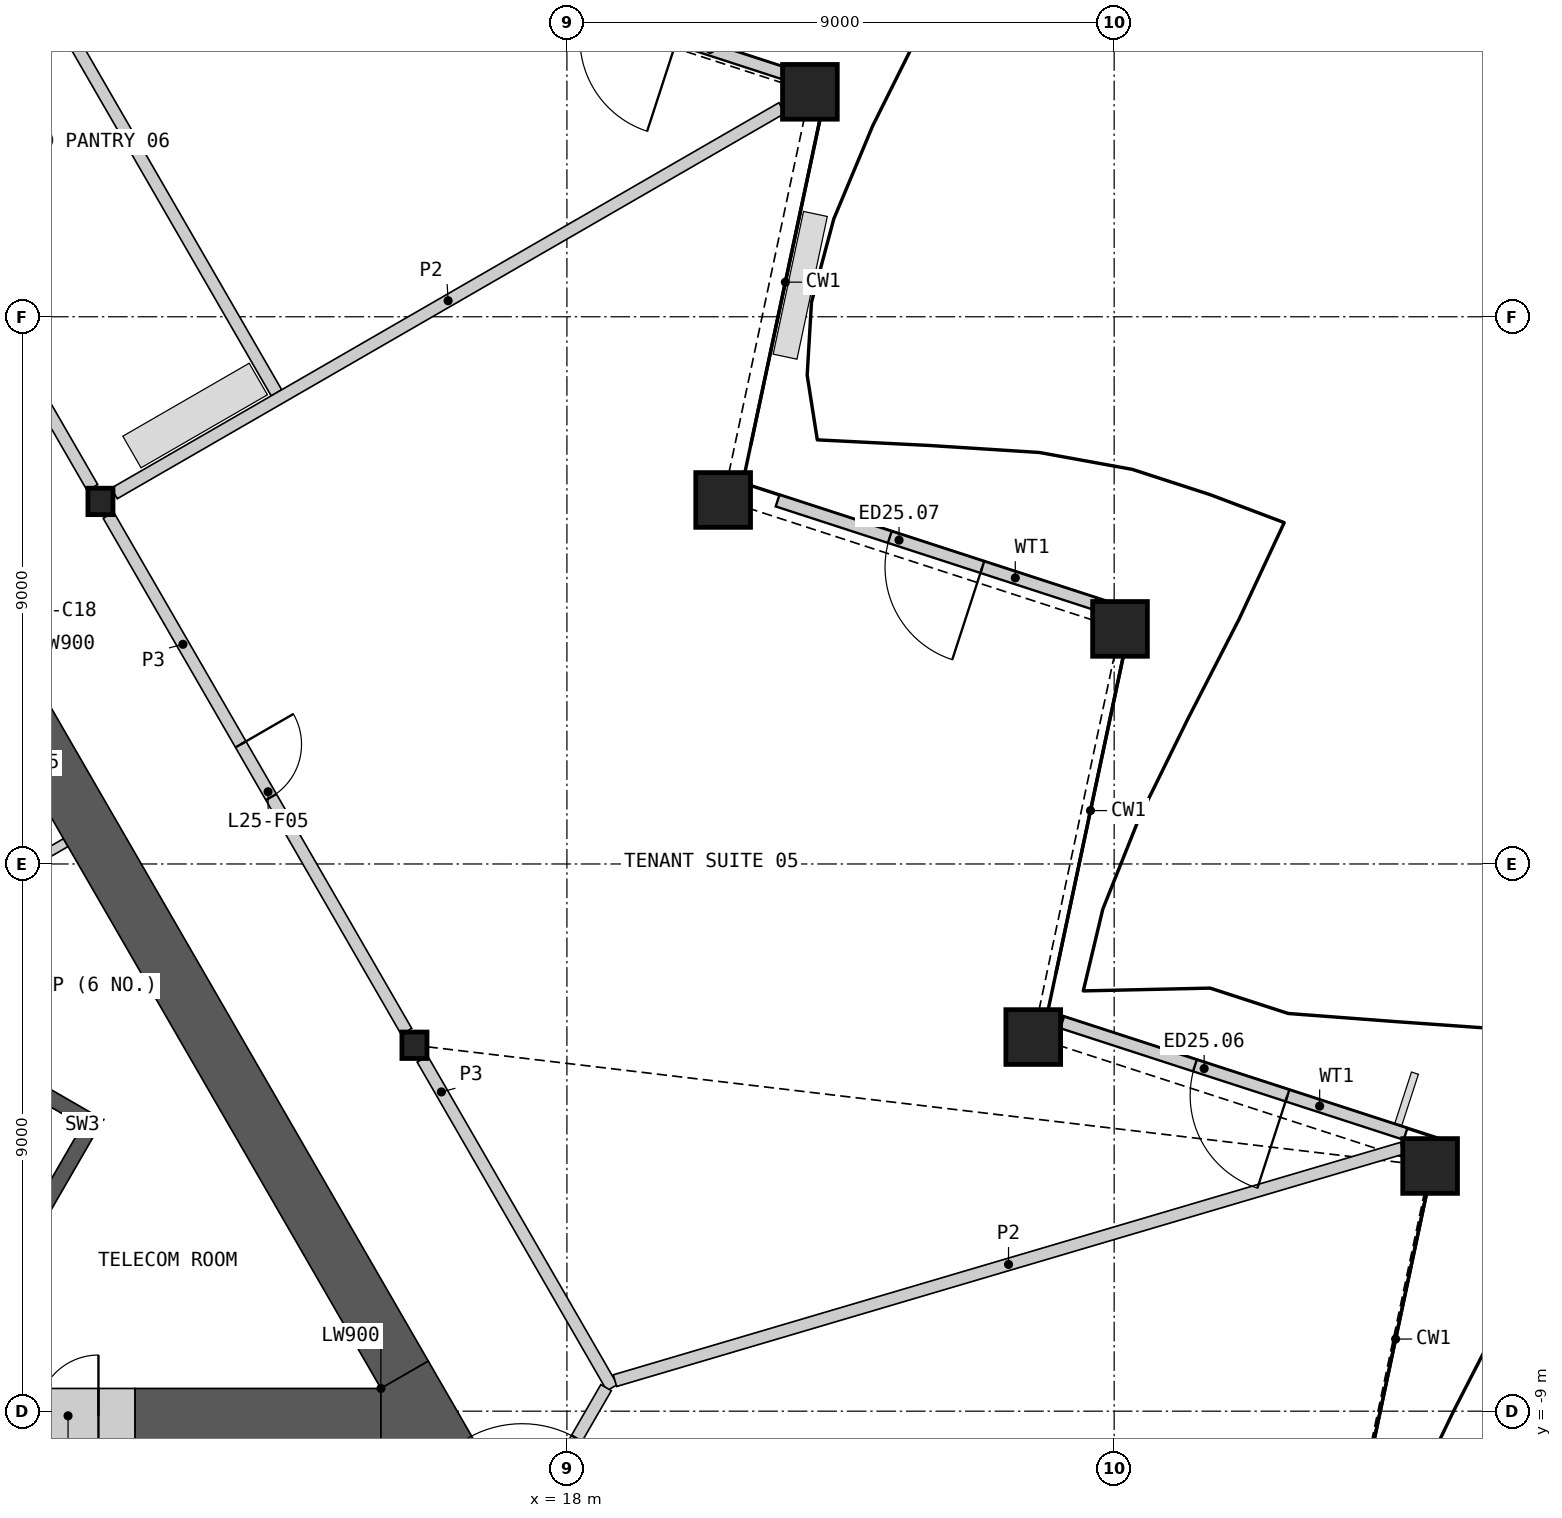
"""IFC4 building model, lengths in metres.
Left out: names, types, materials, properties, quantities, classifications, styles, units other than length and angle.
Written with IfcOpenShell. Run it as: python <this file> out.ifc"""

import sys

from ifc_helpers import new_model, si_unit, direction, frame, frame_2d, origin, origin_2d, place, context, subcontext, project, spatial, polyline, rectangle, hollow_rectangle, i_section, outline, extrude, element, fill, save


model = new_model("IFC4")
c1 = context("Model", 3, precision=1e-05, world=origin(), true_north=direction((0.0, 1.0)))
c2 = subcontext(c1, "Body", "Model", "MODEL_VIEW")
j1 = project(units=[si_unit("LENGTHUNIT", "METRE"), si_unit("PLANEANGLEUNIT", "RADIAN")], contexts=[c1])
p1 = place(None, origin())
s1 = spatial("IfcSite", under=j1, at=p1, CompositionType="ELEMENT")
p2 = place(p1, origin())
s2 = spatial("IfcBuilding", under=s1, at=p2, CompositionType="ELEMENT")
p3 = place(p2, frame((0.0, 0.0, 120.6)))
s3 = spatial("IfcBuildingStorey", under=s2, at=p3, CompositionType="ELEMENT", Elevation=120.6)
for number, where, z_axis, x_axis in (
    (1, (32.196, -4.967, 0.0), (0.0, 0.0, 1.0), (1.0, 0.0, 0.0)),
    (2, (25.669, -2.846, 0.0), (0.0, 0.0, 1.0), (1.0, 0.0, 0.0)),
    (3, (27.096, 3.866, 0.0), (0.0, 0.0, 1.0), (1.0, 0.0, 0.0)),
    (4, (20.57, 5.987, 0.0), (0.0, 0.0, 1.0), (1.0, 0.0, 0.0)),
    (5, (21.996, 12.699, 0.0), (0.0, 0.0, 1.0), (1.0, 0.0, 0.0)),
):
    element("IfcColumn", number, at=place(p3, frame(where, z_axis=z_axis, x_axis=x_axis)), inside=s3, PredefinedType="COLUMN", context=c2, shape_type="SweptSolid", body=[
        extrude(hollow_rectangle(XDim=0.9, YDim=0.9, WallThickness=0.06, at=origin_2d()), origin(), (0.0, 0.0, 1.0), 4.2),
    ])
for number, where, z_axis, x_axis in (
    (6, (15.493, -2.982, 0.0), (0.0, 0.0, 1.0), (1.0, 0.0, 0.0)),
    (7, (10.328, 5.963, 0.0), (0.0, 0.0, 1.0), (1.0, 0.0, 0.0)),
):
    element("IfcColumn", number, at=place(p3, frame(where, z_axis=z_axis, x_axis=x_axis)), inside=s3, PredefinedType="COLUMN", context=c2, shape_type="SweptSolid", body=[
        extrude(i_section(OverallWidth=0.412, OverallDepth=0.435, WebThickness=0.036, FlangeThickness=0.057, at=origin_2d()), origin(), (0.0, 0.0, 1.0), 4.2),
    ])
p4 = place(p3, frame((31.792, -4.441, 0.0), z_axis=(0.0, 0.0, 1.0), x_axis=(-0.951057028782, 0.309015417099, 0.0)))
e8 = element("IfcWall", 8, at=p4, inside=s3, PredefinedType="SOLIDWALL", context=c2, shape_type="SweptSolid", body=[
    extrude(rectangle(XDim=5.938, YDim=0.2, at=frame_2d((2.969, 0.0))), origin(), (0.0, 0.0, 1.0), 3.189),
])
p5 = place(p4, frame((2.042, 0.0, 0.0)))
e9 = element("IfcOpeningElement", 9, at=p5, cuts=e8, PredefinedType="OPENING", context=c2, shape_type="SweptSolid", body=[
    extrude(rectangle(XDim=1.6, YDim=2.4, at=frame_2d((0.8, 1.2))), frame((0.0, 0.11, 0.0), z_axis=(0.0, -1.0, 0.0), x_axis=(1.0, 0.0, 0.0)), (0.0, 0.0, 1.0), 0.22),
])
p6 = place(p3, frame((26.677, 4.282, 0.0), z_axis=(0.0, 0.0, 1.0), x_axis=(-0.951052727247, 0.309028655624, 0.0)))
e10 = element("IfcWall", 10, at=p6, inside=s3, PredefinedType="SOLIDWALL", context=c2, shape_type="SweptSolid", body=[
    extrude(rectangle(XDim=5.48, YDim=0.2, at=frame_2d((2.74, 0.0))), origin(), (0.0, 0.0, 1.0), 3.189),
])
p7 = place(p6, frame((1.94, 0.0, 0.0)))
e11 = element("IfcOpeningElement", 11, at=p7, cuts=e10, PredefinedType="OPENING", context=c2, shape_type="SweptSolid", body=[
    extrude(rectangle(XDim=1.6, YDim=2.4, at=frame_2d((0.8, 1.2))), frame((0.0, 0.11, 0.0), z_axis=(0.0, -1.0, 0.0), x_axis=(1.0, 0.0, 0.0)), (0.0, 0.0, 1.0), 0.22),
])
p8 = place(p3, frame((21.659, 12.973, 0.0), z_axis=(0.0, 0.0, 1.0), x_axis=(-0.951065819309, 0.308988361175, 0.0)))
e12 = element("IfcWall", 12, at=p8, inside=s3, PredefinedType="SOLIDWALL", context=c2, shape_type="SweptSolid", body=[
    extrude(rectangle(XDim=5.48, YDim=0.2, at=frame_2d((2.74, 0.0))), origin(), (0.0, 0.0, 1.0), 3.189),
])
p9 = place(p8, frame((1.94, 0.0, 0.0)))
e13 = element("IfcOpeningElement", 13, at=p9, cuts=e12, PredefinedType="OPENING", context=c2, shape_type="SweptSolid", body=[
    extrude(rectangle(XDim=1.6, YDim=2.4, at=frame_2d((0.8, 1.2))), frame((0.0, 0.11, 0.0), z_axis=(0.0, -1.0, 0.0), x_axis=(1.0, 0.0, 0.0)), (0.0, 0.0, 1.0), 0.22),
])
p10 = place(p3, origin())
e14 = element("IfcWall", 14, at=p10, inside=s3, PredefinedType="SHEAR", context=c2, shape_type="SweptSolid", body=[
    extrude(outline(polyline([(8.83, -6.881), (10.374, -4.206), (10.032, -4.298), (8.738, -6.539), (8.83, -6.881)])), origin(), (0.0, 0.0, 1.0), 3.8),
])
p11 = place(p3, origin())
e15 = element("IfcWall", 15, at=p11, inside=s3, PredefinedType="SHEAR", context=c2, shape_type="SweptSolid", body=[
    extrude(outline(polyline([(10.032, -4.298), (10.374, -4.206), (5.307, -1.281), (5.182, -1.498), (10.032, -4.298)])), origin(), (0.0, 0.0, 1.0), 3.8),
])
p12 = place(p3, frame((8.268, -0.509, 0.0), z_axis=(0.0, 0.0, 1.0), x_axis=(0.866024871741, 0.500000921525, 0.0)))
e16 = element("IfcWall", 16, at=p12, inside=s3, PredefinedType="PARTITIONING", context=c2, shape_type="SweptSolid", body=[
    extrude(rectangle(XDim=1.72, YDim=0.15, at=frame_2d((0.86, 0.0))), origin(), (0.0, 0.0, 1.0), 3.8),
])
p13 = place(p3, frame((10.896, -9.076, 0.0), z_axis=(0.0, 0.0, 1.0), x_axis=(1.0, 0.0, 0.0)))
e17 = element("IfcWall", 17, at=p13, inside=s3, PredefinedType="SHEAR", context=c2, shape_type="SweptSolid", body=[
    extrude(rectangle(XDim=4.046, YDim=0.9, at=frame_2d((2.023, 0.0))), origin(), (0.0, 0.0, 1.0), 3.8),
])
p14 = place(p3, frame((15.331, -8.401, 0.0), z_axis=(0.0, 0.0, 1.0), x_axis=(-0.49999216708, 0.866029926076, 0.0)))
e18 = element("IfcWall", 18, at=p14, inside=s3, PredefinedType="SHEAR", context=c2, shape_type="SweptSolid", body=[
    extrude(rectangle(XDim=12.641, YDim=0.9, at=frame_2d((6.321, 0.0))), origin(), (0.0, 0.0, 1.0), 3.8),
])
p15 = place(p3, origin())
e19 = element("IfcWall", 19, at=p15, inside=s3, PredefinedType="SHEAR", context=c2, shape_type="SweptSolid", body=[
    extrude(outline(polyline([(14.941, -8.626), (15.721, -8.176), (16.5, -9.526), (14.941, -9.526), (14.941, -8.626)])), origin(), (0.0, 0.0, 1.0), 3.8),
])
p16 = place(p3, frame((8.696, -9.076, 0.0), z_axis=(0.0, 0.0, 1.0), x_axis=(1.0, 0.0, 0.0)))
e20 = element("IfcWall", 20, at=p16, inside=s3, PredefinedType="SHEAR", context=c2, shape_type="SweptSolid", body=[
    extrude(rectangle(XDim=2.2, YDim=0.9, at=frame_2d((1.1, 0.0))), origin(), (0.0, 0.0, 1.0), 3.8),
])
p17 = place(p16, frame((0.6, 0.0, 0.0)))
e21 = element("IfcOpeningElement", 21, at=p17, cuts=e20, PredefinedType="OPENING", context=c2, shape_type="SweptSolid", body=[
    extrude(rectangle(XDim=1.0, YDim=2.1, at=frame_2d((0.5, 1.05))), frame((0.0, 0.46, 0.0), z_axis=(0.0, -1.0, 0.0), x_axis=(1.0, 0.0, 0.0)), (0.0, 0.0, 1.0), 0.92),
])
p18 = place(p3, frame((10.46, 5.736, 0.0), z_axis=(0.0, 0.0, 1.0), x_axis=(0.500004141693, -0.866023012564, 0.0)))
e22 = element("IfcWall", 22, at=p18, inside=s3, PredefinedType="PARTITIONING", context=c2, shape_type="SweptSolid", body=[
    extrude(rectangle(XDim=9.803, YDim=0.2, at=frame_2d((4.902, 0.0))), origin(), (0.0, 0.0, 1.0), 3.8),
])
p19 = place(p18, frame((4.352, 0.0, 0.0)))
e23 = element("IfcOpeningElement", 23, at=p19, cuts=e22, PredefinedType="OPENING", context=c2, shape_type="SweptSolid", body=[
    extrude(rectangle(XDim=1.0, YDim=2.1, at=frame_2d((0.5, 1.05))), frame((0.0, 0.11, 0.0), z_axis=(0.0, -1.0, 0.0), x_axis=(1.0, 0.0, 0.0)), (0.0, 0.0, 1.0), 0.22),
])
p20 = place(p3, frame((5.295, 14.68, 0.0), z_axis=(0.0, 0.0, 1.0), x_axis=(0.500012035596, -0.866018454918, 0.0)))
e24 = element("IfcWall", 24, at=p20, inside=s3, PredefinedType="PARTITIONING", context=c2, shape_type="SweptSolid", body=[
    extrude(rectangle(XDim=9.803, YDim=0.2, at=frame_2d((4.902, 0.0))), origin(), (0.0, 0.0, 1.0), 3.8),
])
p21 = place(p20, frame((4.376, 0.0, 0.0)))
e25 = element("IfcOpeningElement", 25, at=p21, cuts=e24, PredefinedType="OPENING", context=c2, shape_type="SweptSolid", body=[
    extrude(rectangle(XDim=0.95, YDim=2.1, at=frame_2d((0.475, 1.05))), frame((0.0, 0.11, 0.0), z_axis=(0.0, -1.0, 0.0), x_axis=(1.0, 0.0, 0.0)), (0.0, 0.0, 1.0), 0.22),
])
p22 = place(p3, frame((15.624, -3.209, 0.0), z_axis=(0.0, 0.0, 1.0), x_axis=(0.499997920671, -0.866026604282, 0.0)))
e26 = element("IfcWall", 26, at=p22, inside=s3, PredefinedType="PARTITIONING", context=c2, shape_type="SweptSolid", body=[
    extrude(rectangle(XDim=6.24, YDim=0.2, at=frame_2d((3.12, 0.0))), origin(), (0.0, 0.0, 1.0), 3.8),
])
p23 = place(p3, frame((16.781, -11.84, 0.0), z_axis=(0.0, 0.0, 1.0), x_axis=(0.499958791762, 0.866049194065, 0.0)))
e27 = element("IfcWall", 27, at=p23, inside=s3, PredefinedType="PARTITIONING", context=c2, shape_type="SweptSolid", body=[
    extrude(rectangle(XDim=3.726, YDim=0.2, at=frame_2d((1.863, 0.0))), origin(), (0.0, 0.0, 1.0), 3.8),
])
p24 = place(p23, frame((0.963, 0.0, 0.0)))
e28 = element("IfcOpeningElement", 28, at=p24, cuts=e27, PredefinedType="OPENING", context=c2, shape_type="SweptSolid", body=[
    extrude(rectangle(XDim=1.8, YDim=2.1, at=frame_2d((0.9, 1.05))), frame((0.0, 0.11, 0.0), z_axis=(0.0, -1.0, 0.0), x_axis=(1.0, 0.0, 0.0)), (0.0, 0.0, 1.0), 0.22),
])
p25 = place(p3, frame((4.548, 22.775, 0.0), z_axis=(0.0, 0.0, 1.0), x_axis=(0.499999764473, -0.866025539766, 0.0)))
e29 = element("IfcWall", 29, at=p25, inside=s3, PredefinedType="PARTITIONING", context=c2, shape_type="SweptSolid", body=[
    extrude(rectangle(XDim=17.35, YDim=0.2, at=frame_2d((8.675, 0.0))), origin(), (0.0, 0.0, 1.0), 2.885),
])
p26 = place(p25, frame((7.65, 0.0, 0.0)))
e30 = element("IfcOpeningElement", 30, at=p26, cuts=e29, PredefinedType="OPENING", context=c2, shape_type="SweptSolid", body=[
    extrude(rectangle(XDim=0.95, YDim=2.1, at=frame_2d((0.475, 1.05))), frame((0.0, 0.11, 0.0), z_axis=(0.0, -1.0, 0.0), x_axis=(1.0, 0.0, 0.0)), (0.0, 0.0, 1.0), 0.22),
])
p27 = place(p3, frame((18.79, -8.498, 0.0), z_axis=(0.0, 0.0, 1.0), x_axis=(0.959053889024, 0.283223653581, 0.0)))
e31 = element("IfcWall", 31, at=p27, inside=s3, PredefinedType="PARTITIONING", context=c2, shape_type="SweptSolid", body=[
    extrude(rectangle(XDim=13.499, YDim=0.2, at=frame_2d((6.75, 0.0))), origin(), (0.0, 0.0, 1.0), 2.885),
])
p28 = place(p3, frame((10.556, 6.094, 0.0), z_axis=(0.0, 0.0, 1.0), x_axis=(0.86602461759, 0.500001361726, 0.0)))
e32 = element("IfcWall", 32, at=p28, inside=s3, PredefinedType="PARTITIONING", context=c2, shape_type="SweptSolid", body=[
    extrude(rectangle(XDim=12.679, YDim=0.2, at=frame_2d((6.34, 0.0))), origin(), (0.0, 0.0, 1.0), 2.885),
])
p29 = place(p5, origin())
e33 = element("IfcDoor", 33, at=p29, inside=s3, OperationType="DOUBLE_DOOR_SINGLE_SWING", PredefinedType="DOOR", context=c2, shape_type="SweptSolid", body=[
    extrude(rectangle(XDim=1.6, YDim=2.4, at=frame_2d((0.8, 1.2))), frame((0.0, 0.025, 0.0), z_axis=(0.0, -1.0, 0.0), x_axis=(1.0, 0.0, 0.0)), (0.0, 0.0, 1.0), 0.05),
])
fill(e9, e33)
p30 = place(p7, origin())
e34 = element("IfcDoor", 34, at=p30, inside=s3, OperationType="DOUBLE_DOOR_SINGLE_SWING", PredefinedType="DOOR", context=c2, shape_type="SweptSolid", body=[
    extrude(rectangle(XDim=1.6, YDim=2.4, at=frame_2d((0.8, 1.2))), frame((0.0, 0.025, 0.0), z_axis=(0.0, -1.0, 0.0), x_axis=(1.0, 0.0, 0.0)), (0.0, 0.0, 1.0), 0.05),
])
fill(e11, e34)
p31 = place(p17, origin())
e35 = element("IfcDoor", 35, at=p31, inside=s3, OperationType="SINGLE_SWING_RIGHT", PredefinedType="DOOR", context=c2, shape_type="SweptSolid", body=[
    extrude(rectangle(XDim=1.0, YDim=2.1, at=frame_2d((0.5, 1.05))), frame((0.0, 0.205, 0.0), z_axis=(0.0, -1.0, 0.0), x_axis=(1.0, 0.0, 0.0)), (0.0, 0.0, 1.0), 0.05),
])
fill(e21, e35)
p32 = place(p24, origin())
e36 = element("IfcDoor", 36, at=p32, inside=s3, OperationType="DOUBLE_DOOR_SINGLE_SWING", PredefinedType="DOOR", context=c2, shape_type="SweptSolid", body=[
    extrude(rectangle(XDim=1.8, YDim=2.1, at=frame_2d((0.9, 1.05))), frame((0.0, 0.025, 0.0), z_axis=(0.0, -1.0, 0.0), x_axis=(1.0, 0.0, 0.0)), (0.0, 0.0, 1.0), 0.05),
])
fill(e28, e36)
p33 = place(p19, origin())
e37 = element("IfcDoor", 37, at=p33, inside=s3, OperationType="SINGLE_SWING_LEFT", PredefinedType="DOOR", context=c2, shape_type="SweptSolid", body=[
    extrude(rectangle(XDim=1.0, YDim=2.1, at=frame_2d((0.5, 1.05))), frame((0.0, 0.025, 0.0), z_axis=(0.0, -1.0, 0.0), x_axis=(1.0, 0.0, 0.0)), (0.0, 0.0, 1.0), 0.05),
])
fill(e23, e37)
save(model, sys.argv[1])
